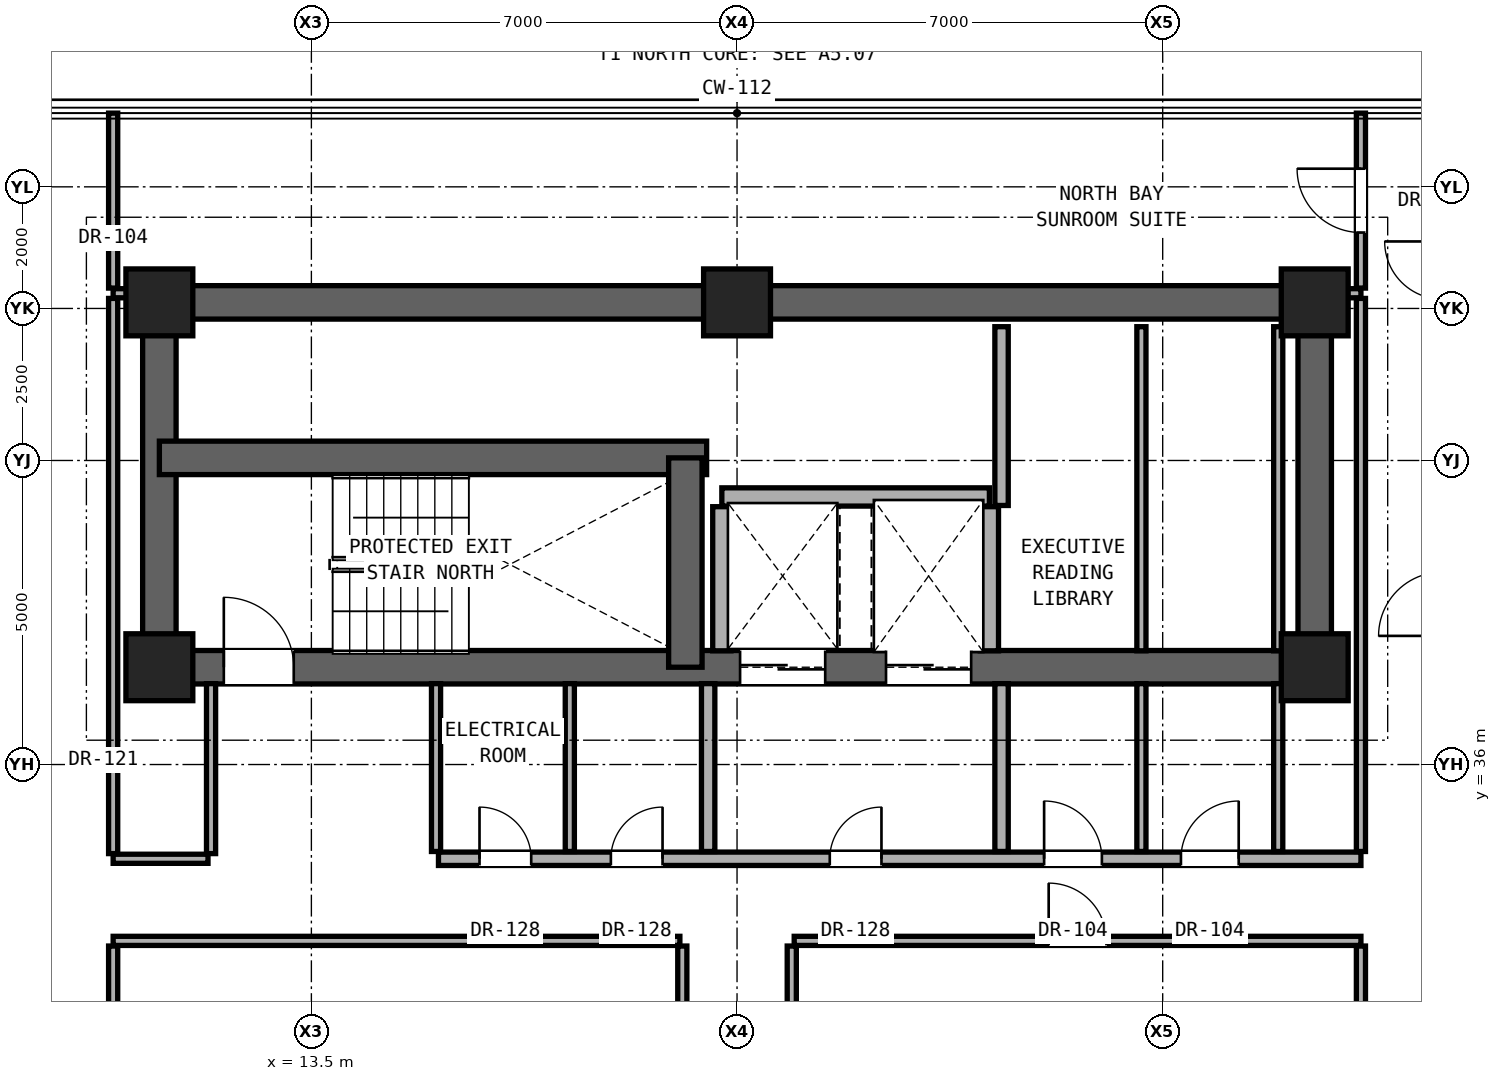
"""IFC4 building model, lengths in metres.
Left out: names, types, materials, properties, quantities, classifications, styles, units other than length and angle.
Written with IfcOpenShell. Run it as: python <this file> out.ifc"""

import sys

from ifc_helpers import new_model, si_unit, direction, frame, frame_2d, origin, origin_2d, place, context, subcontext, project, spatial, rectangle, extrude, element, fill, save


model = new_model("IFC4")
c1 = context("Model", 3, precision=1e-05, world=origin(), true_north=direction((0.0, 1.0)))
c2 = subcontext(c1, "Body", "Model", "MODEL_VIEW")
j1 = project(units=[si_unit("LENGTHUNIT", "METRE"), si_unit("PLANEANGLEUNIT", "RADIAN")], contexts=[c1])
p1 = place(None, origin())
s1 = spatial("IfcSite", under=j1, at=p1, CompositionType="ELEMENT")
p2 = place(p1, origin())
s2 = spatial("IfcBuilding", under=s1, at=p2, CompositionType="ELEMENT")
p3 = place(p2, frame((0.0, 0.0, 131.3)))
s3 = spatial("IfcBuildingStorey", under=s2, at=p3, CompositionType="ELEMENT", Elevation=131.3)
for number, where, z_axis, x_axis in (
    (1, (11.0, 37.6, 0.0), (0.0, 0.0, 1.0), (1.0, 0.0, 0.0)),
    (2, (30.0, 37.6, 0.0), (0.0, 0.0, 1.0), (1.0, 0.0, 0.0)),
    (3, (11.0, 43.6, 0.0), (0.0, 0.0, 1.0), (1.0, 0.0, 0.0)),
    (4, (20.5, 43.6, 0.0), (0.0, 0.0, 1.0), (1.0, 0.0, 0.0)),
    (5, (30.0, 43.6, 0.0), (0.0, 0.0, 1.0), (1.0, 0.0, 0.0)),
):
    element("IfcColumn", number, at=place(p3, frame(where, z_axis=z_axis, x_axis=x_axis)), inside=s3, PredefinedType="COLUMN", context=c2, shape_type="SweptSolid", body=[
        extrude(rectangle(XDim=1.1, YDim=1.1, at=origin_2d()), origin(), (0.0, 0.0, 1.0), 3.3),
    ])
p4 = place(p3, frame((11.0, 43.6, 0.0), z_axis=(0.0, 0.0, 1.0), x_axis=(1.0, 0.0, 0.0)))
e6 = element("IfcWall", 6, at=p4, inside=s3, PredefinedType="SHEAR", context=c2, shape_type="SweptSolid", body=[
    extrude(rectangle(XDim=19.0, YDim=0.55, at=frame_2d((9.5, 0.0))), origin(), (0.0, 0.0, 1.0), 3.08),
])
for number, where, z_axis, x_axis in (
    (7, (11.0, 37.6, 0.0), (0.0, 0.0, 1.0), (0.0, 1.0, 0.0)),
    (8, (30.0, 37.6, 0.0), (0.0, 0.0, 1.0), (0.0, 1.0, 0.0)),
):
    element("IfcWall", number, at=place(p3, frame(where, z_axis=z_axis, x_axis=x_axis)), inside=s3, PredefinedType="SHEAR", context=c2, shape_type="SweptSolid", body=[
        extrude(rectangle(XDim=6.0, YDim=0.55, at=frame_2d((3.0, 0.0))), origin(), (0.0, 0.0, 1.0), 3.08),
    ])
p5 = place(p3, frame((11.0, 37.6, 0.0), z_axis=(0.0, 0.0, 1.0), x_axis=(1.0, 0.0, 0.0)))
e9 = element("IfcWall", 9, at=p5, inside=s3, PredefinedType="SHEAR", context=c2, shape_type="SweptSolid", body=[
    extrude(rectangle(XDim=19.0, YDim=0.55, at=frame_2d((9.5, 0.0))), origin(), (0.0, 0.0, 1.0), 3.08),
])
p6 = place(p5, frame((1.06, 0.0, 0.0)))
e10 = element("IfcOpeningElement", 10, at=p6, cuts=e9, PredefinedType="OPENING", context=c2, shape_type="SweptSolid", body=[
    extrude(rectangle(XDim=1.15, YDim=2.2, at=frame_2d((0.575, 1.1))), frame((0.0, 0.285, 0.0), z_axis=(0.0, -1.0, 0.0), x_axis=(1.0, 0.0, 0.0)), (0.0, 0.0, 1.0), 0.57),
])
p7 = place(p5, frame((9.55, 0.0, 0.0)))
e11 = element("IfcOpeningElement", 11, at=p7, cuts=e9, PredefinedType="OPENING", context=c2, shape_type="SweptSolid", body=[
    extrude(rectangle(XDim=1.4, YDim=2.35, at=frame_2d((0.7, 1.175))), frame((0.0, 0.285, 0.0), z_axis=(0.0, -1.0, 0.0), x_axis=(1.0, 0.0, 0.0)), (0.0, 0.0, 1.0), 0.57),
])
p8 = place(p5, frame((11.95, 0.0, 0.0)))
e12 = element("IfcOpeningElement", 12, at=p8, cuts=e9, PredefinedType="OPENING", context=c2, shape_type="SweptSolid", body=[
    extrude(rectangle(XDim=1.4, YDim=2.35, at=frame_2d((0.7, 1.175))), frame((0.0, 0.285, 0.0), z_axis=(0.0, -1.0, 0.0), x_axis=(1.0, 0.0, 0.0)), (0.0, 0.0, 1.0), 0.57),
])
p9 = place(p3, frame((11.0, 41.043, 0.0), z_axis=(0.0, 0.0, 1.0), x_axis=(1.0, 0.0, 0.0)))
e13 = element("IfcWall", 13, at=p9, inside=s3, PredefinedType="SHEAR", context=c2, shape_type="SweptSolid", body=[
    extrude(rectangle(XDim=9.0, YDim=0.55, at=frame_2d((4.5, 0.0))), origin(), (0.0, 0.0, 1.0), 3.08),
])
p10 = place(p3, frame((19.65, 37.6, 0.0), z_axis=(0.0, 0.0, 1.0), x_axis=(0.0, 1.0, 0.0)))
e14 = element("IfcWall", 14, at=p10, inside=s3, PredefinedType="SHEAR", context=c2, shape_type="SweptSolid", body=[
    extrude(rectangle(XDim=3.443, YDim=0.55, at=frame_2d((1.721, 0.0))), origin(), (0.0, 0.0, 1.0), 3.08),
])
p11 = place(p3, frame((10.24, 33.1, 0.0), z_axis=(0.0, 0.0, 1.0), x_axis=(1.0, 0.0, 0.0)))
e15 = element("IfcWall", 15, at=p11, inside=s3, PredefinedType="PARTITIONING", context=c2, shape_type="SweptSolid", body=[
    extrude(rectangle(XDim=9.32, YDim=0.15, at=frame_2d((4.66, 0.0))), origin(), (0.0, 0.0, 1.0), 2.216),
])
p12 = place(p3, frame((21.44, 33.1, 0.0), z_axis=(0.0, 0.0, 1.0), x_axis=(1.0, 0.0, 0.0)))
e16 = element("IfcWall", 16, at=p12, inside=s3, PredefinedType="PARTITIONING", context=c2, shape_type="SweptSolid", body=[
    extrude(rectangle(XDim=9.32, YDim=0.15, at=frame_2d((4.66, 0.0))), origin(), (0.0, 0.0, 1.0), 2.216),
])
p13 = place(p12, frame((4.185, 0.0, 0.0)))
e17 = element("IfcOpeningElement", 17, at=p13, cuts=e16, PredefinedType="OPENING", context=c2, shape_type="SweptSolid", body=[
    extrude(rectangle(XDim=0.95, YDim=2.15, at=frame_2d((0.475, 1.075))), frame((0.0, 0.085, 0.0), z_axis=(0.0, -1.0, 0.0), x_axis=(1.0, 0.0, 0.0)), (0.0, 0.0, 1.0), 0.17),
])
p14 = place(p3, frame((10.24, 34.45, 0.0), z_axis=(0.0, 0.0, 1.0), x_axis=(1.0, 0.0, 0.0)))
e18 = element("IfcWall", 18, at=p14, inside=s3, PredefinedType="PARTITIONING", context=c2, shape_type="SweptSolid", body=[
    extrude(rectangle(XDim=1.56, YDim=0.15, at=frame_2d((0.78, 0.0))), origin(), (0.0, 0.0, 1.0), 2.216),
])
p15 = place(p3, frame((15.59, 34.45, 0.0), z_axis=(0.0, 0.0, 1.0), x_axis=(1.0, 0.0, 0.0)))
e19 = element("IfcWall", 19, at=p15, inside=s3, PredefinedType="SOLIDWALL", context=c2, shape_type="SweptSolid", body=[
    extrude(rectangle(XDim=15.17, YDim=0.22, at=frame_2d((7.585, 0.0))), origin(), (0.0, 0.0, 1.0), 2.216),
])
p16 = place(p15, frame((6.435, 0.0, 0.0)))
e20 = element("IfcOpeningElement", 20, at=p16, cuts=e19, PredefinedType="OPENING", context=c2, shape_type="SweptSolid", body=[
    extrude(rectangle(XDim=0.85, YDim=2.01, at=frame_2d((0.425, 1.005))), frame((0.0, 0.12, 0.0), z_axis=(0.0, -1.0, 0.0), x_axis=(1.0, 0.0, 0.0)), (0.0, 0.0, 1.0), 0.24),
])
p17 = place(p15, frame((9.96, 0.0, 0.0)))
e21 = element("IfcOpeningElement", 21, at=p17, cuts=e19, PredefinedType="OPENING", context=c2, shape_type="SweptSolid", body=[
    extrude(rectangle(XDim=0.95, YDim=2.15, at=frame_2d((0.475, 1.075))), frame((0.0, 0.12, 0.0), z_axis=(0.0, -1.0, 0.0), x_axis=(1.0, 0.0, 0.0)), (0.0, 0.0, 1.0), 0.24),
])
p18 = place(p15, frame((12.21, 0.0, 0.0)))
e22 = element("IfcOpeningElement", 22, at=p18, cuts=e19, PredefinedType="OPENING", context=c2, shape_type="SweptSolid", body=[
    extrude(rectangle(XDim=0.95, YDim=2.15, at=frame_2d((0.475, 1.075))), frame((0.0, 0.12, 0.0), z_axis=(0.0, -1.0, 0.0), x_axis=(1.0, 0.0, 0.0)), (0.0, 0.0, 1.0), 0.24),
])
p19 = place(p15, frame((0.675, 0.0, 0.0)))
e23 = element("IfcOpeningElement", 23, at=p19, cuts=e19, PredefinedType="OPENING", context=c2, shape_type="SweptSolid", body=[
    extrude(rectangle(XDim=0.85, YDim=2.01, at=frame_2d((0.425, 1.005))), frame((0.0, 0.12, 0.0), z_axis=(0.0, -1.0, 0.0), x_axis=(1.0, 0.0, 0.0)), (0.0, 0.0, 1.0), 0.24),
])
p20 = place(p15, frame((2.835, 0.0, 0.0)))
e24 = element("IfcOpeningElement", 24, at=p20, cuts=e19, PredefinedType="OPENING", context=c2, shape_type="SweptSolid", body=[
    extrude(rectangle(XDim=0.85, YDim=2.01, at=frame_2d((0.425, 1.005))), frame((0.0, 0.12, 0.0), z_axis=(0.0, -1.0, 0.0), x_axis=(1.0, 0.0, 0.0)), (0.0, 0.0, 1.0), 0.24),
])
p21 = place(p3, frame((20.25, 40.4, 0.0), z_axis=(0.0, 0.0, 1.0), x_axis=(1.0, 0.0, 0.0)))
e25 = element("IfcWall", 25, at=p21, inside=s3, PredefinedType="SOLIDWALL", context=c2, shape_type="SweptSolid", body=[
    extrude(rectangle(XDim=4.4, YDim=0.3, at=frame_2d((2.2, 0.0))), origin(), (0.0, 0.0, 1.0), 3.08),
])
for number, where, z_axis, x_axis in (
    (26, (10.24, 43.75, 0.0), (0.0, 0.0, 1.0), (1.0, 0.0, 0.0)),
    (27, (30.27, 43.75, 0.0), (0.0, 0.0, 1.0), (1.0, 0.0, 0.0)),
):
    element("IfcWall", number, at=place(p3, frame(where, z_axis=z_axis, x_axis=x_axis)), inside=s3, PredefinedType="PARTITIONING", context=c2, shape_type="SweptSolid", body=[
        extrude(rectangle(XDim=0.49, YDim=0.15, at=frame_2d((0.245, 0.0))), origin(), (0.0, 0.0, 1.0), 3.08),
    ])
p22 = place(p3, frame((10.24, 27.485, 0.0), z_axis=(0.0, 0.0, 1.0), x_axis=(0.0, 1.0, 0.0)))
e28 = element("IfcWall", 28, at=p22, inside=s3, PredefinedType="PARTITIONING", context=c2, shape_type="SweptSolid", body=[
    extrude(rectangle(XDim=5.53, YDim=0.15, at=frame_2d((2.765, 0.0))), origin(), (0.0, 0.0, 1.0), 2.299),
])
p23 = place(p22, frame((2.29, 0.0, 0.0)))
e29 = element("IfcOpeningElement", 29, at=p23, cuts=e28, PredefinedType="OPENING", context=c2, shape_type="SweptSolid", body=[
    extrude(rectangle(XDim=0.95, YDim=2.15, at=frame_2d((0.475, 1.075))), frame((0.0, 0.085, 0.0), z_axis=(0.0, -1.0, 0.0), x_axis=(1.0, 0.0, 0.0)), (0.0, 0.0, 1.0), 0.17),
])
p24 = place(p3, frame((10.24, 34.535, 0.0), z_axis=(0.0, 0.0, 1.0), x_axis=(0.0, 1.0, 0.0)))
e30 = element("IfcWall", 30, at=p24, inside=s3, PredefinedType="PARTITIONING", context=c2, shape_type="SweptSolid", body=[
    extrude(rectangle(XDim=9.13, YDim=0.15, at=frame_2d((4.565, 0.0))), origin(), (0.0, 0.0, 1.0), 2.456),
])
p25 = place(p3, frame((10.24, 43.835, 0.0), z_axis=(0.0, 0.0, 1.0), x_axis=(0.0, 1.0, 0.0)))
e31 = element("IfcWall", 31, at=p25, inside=s3, PredefinedType="PARTITIONING", context=c2, shape_type="SweptSolid", body=[
    extrude(rectangle(XDim=2.877, YDim=0.15, at=frame_2d((1.438, 0.0))), origin(), (0.0, 0.0, 1.0), 3.08),
])
p26 = place(p3, frame((11.85, 34.535, 0.0), z_axis=(0.0, 0.0, 1.0), x_axis=(0.0, 1.0, 0.0)))
e32 = element("IfcWall", 32, at=p26, inside=s3, PredefinedType="PARTITIONING", context=c2, shape_type="SweptSolid", body=[
    extrude(rectangle(XDim=2.795, YDim=0.15, at=frame_2d((1.397, 0.0))), origin(), (0.0, 0.0, 1.0), 3.08),
])
p27 = place(p3, frame((15.55, 34.57, 0.0), z_axis=(0.0, 0.0, 1.0), x_axis=(0.0, 1.0, 0.0)))
e33 = element("IfcWall", 33, at=p27, inside=s3, PredefinedType="PARTITIONING", context=c2, shape_type="SweptSolid", body=[
    extrude(rectangle(XDim=2.76, YDim=0.15, at=frame_2d((1.38, 0.0))), origin(), (0.0, 0.0, 1.0), 2.609),
])
p28 = place(p3, frame((17.75, 34.57, 0.0), z_axis=(0.0, 0.0, 1.0), x_axis=(0.0, 1.0, 0.0)))
e34 = element("IfcWall", 34, at=p28, inside=s3, PredefinedType="PARTITIONING", context=c2, shape_type="SweptSolid", body=[
    extrude(rectangle(XDim=2.76, YDim=0.15, at=frame_2d((1.38, 0.0))), origin(), (0.0, 0.0, 1.0), 3.08),
])
p29 = place(p3, frame((19.6, 27.485, 0.0), z_axis=(0.0, 0.0, 1.0), x_axis=(0.0, 1.0, 0.0)))
e35 = element("IfcWall", 35, at=p29, inside=s3, PredefinedType="PARTITIONING", context=c2, shape_type="SweptSolid", body=[
    extrude(rectangle(XDim=5.53, YDim=0.15, at=frame_2d((2.765, 0.0))), origin(), (0.0, 0.0, 1.0), 2.216),
])
p30 = place(p3, frame((20.025, 34.57, 0.0), z_axis=(0.0, 0.0, 1.0), x_axis=(0.0, 1.0, 0.0)))
e36 = element("IfcWall", 36, at=p30, inside=s3, PredefinedType="SOLIDWALL", context=c2, shape_type="SweptSolid", body=[
    extrude(rectangle(XDim=2.76, YDim=0.22, at=frame_2d((1.38, 0.0))), origin(), (0.0, 0.0, 1.0), 3.08),
])
p31 = place(p3, frame((20.25, 37.87, 0.0), z_axis=(0.0, 0.0, 1.0), x_axis=(0.0, 1.0, 0.0)))
e37 = element("IfcWall", 37, at=p31, inside=s3, PredefinedType="SOLIDWALL", context=c2, shape_type="SweptSolid", body=[
    extrude(rectangle(XDim=2.37, YDim=0.3, at=frame_2d((1.185, 0.0))), origin(), (0.0, 0.0, 1.0), 3.08),
])
p32 = place(p3, frame((21.4, 27.485, 0.0), z_axis=(0.0, 0.0, 1.0), x_axis=(0.0, 1.0, 0.0)))
e38 = element("IfcWall", 38, at=p32, inside=s3, PredefinedType="PARTITIONING", context=c2, shape_type="SweptSolid", body=[
    extrude(rectangle(XDim=5.53, YDim=0.15, at=frame_2d((2.765, 0.0))), origin(), (0.0, 0.0, 1.0), 2.216),
])
p33 = place(p3, frame((24.65, 37.87, 0.0), z_axis=(0.0, 0.0, 1.0), x_axis=(0.0, 1.0, 0.0)))
e39 = element("IfcWall", 39, at=p33, inside=s3, PredefinedType="SOLIDWALL", context=c2, shape_type="SweptSolid", body=[
    extrude(rectangle(XDim=2.37, YDim=0.3, at=frame_2d((1.185, 0.0))), origin(), (0.0, 0.0, 1.0), 3.08),
])
p34 = place(p3, frame((24.85, 34.57, 0.0), z_axis=(0.0, 0.0, 1.0), x_axis=(0.0, 1.0, 0.0)))
e40 = element("IfcWall", 40, at=p34, inside=s3, PredefinedType="SOLIDWALL", context=c2, shape_type="SweptSolid", body=[
    extrude(rectangle(XDim=2.76, YDim=0.22, at=frame_2d((1.38, 0.0))), origin(), (0.0, 0.0, 1.0), 3.08),
])
p35 = place(p3, frame((24.85, 40.26, 0.0), z_axis=(0.0, 0.0, 1.0), x_axis=(0.0, 1.0, 0.0)))
e41 = element("IfcWall", 41, at=p35, inside=s3, PredefinedType="SOLIDWALL", context=c2, shape_type="SweptSolid", body=[
    extrude(rectangle(XDim=2.94, YDim=0.22, at=frame_2d((1.47, 0.0))), origin(), (0.0, 0.0, 1.0), 3.08),
])
p36 = place(p3, frame((27.15, 34.57, 0.0), z_axis=(0.0, 0.0, 1.0), x_axis=(0.0, 1.0, 0.0)))
e42 = element("IfcWall", 42, at=p36, inside=s3, PredefinedType="PARTITIONING", context=c2, shape_type="SweptSolid", body=[
    extrude(rectangle(XDim=2.76, YDim=0.15, at=frame_2d((1.38, 0.0))), origin(), (0.0, 0.0, 1.0), 3.08),
])
p37 = place(p3, frame((27.15, 37.87, 0.0), z_axis=(0.0, 0.0, 1.0), x_axis=(0.0, 1.0, 0.0)))
e43 = element("IfcWall", 43, at=p37, inside=s3, PredefinedType="PARTITIONING", context=c2, shape_type="SweptSolid", body=[
    extrude(rectangle(XDim=5.33, YDim=0.15, at=frame_2d((2.665, 0.0))), origin(), (0.0, 0.0, 1.0), 3.08),
])
p38 = place(p3, frame((29.4, 34.57, 0.0), z_axis=(0.0, 0.0, 1.0), x_axis=(0.0, 1.0, 0.0)))
e44 = element("IfcWall", 44, at=p38, inside=s3, PredefinedType="PARTITIONING", context=c2, shape_type="SweptSolid", body=[
    extrude(rectangle(XDim=2.76, YDim=0.15, at=frame_2d((1.38, 0.0))), origin(), (0.0, 0.0, 1.0), 3.08),
])
p39 = place(p3, frame((29.4, 37.87, 0.0), z_axis=(0.0, 0.0, 1.0), x_axis=(0.0, 1.0, 0.0)))
e45 = element("IfcWall", 45, at=p39, inside=s3, PredefinedType="PARTITIONING", context=c2, shape_type="SweptSolid", body=[
    extrude(rectangle(XDim=5.33, YDim=0.15, at=frame_2d((2.665, 0.0))), origin(), (0.0, 0.0, 1.0), 3.08),
])
p40 = place(p3, frame((30.76, 27.485, 0.0), z_axis=(0.0, 0.0, 1.0), x_axis=(0.0, 1.0, 0.0)))
e46 = element("IfcWall", 46, at=p40, inside=s3, PredefinedType="PARTITIONING", context=c2, shape_type="SweptSolid", body=[
    extrude(rectangle(XDim=5.53, YDim=0.15, at=frame_2d((2.765, 0.0))), origin(), (0.0, 0.0, 1.0), 2.299),
])
p41 = place(p3, frame((30.76, 34.57, 0.0), z_axis=(0.0, 0.0, 1.0), x_axis=(0.0, 1.0, 0.0)))
e47 = element("IfcWall", 47, at=p41, inside=s3, PredefinedType="PARTITIONING", context=c2, shape_type="SweptSolid", body=[
    extrude(rectangle(XDim=9.095, YDim=0.15, at=frame_2d((4.547, 0.0))), origin(), (0.0, 0.0, 1.0), 2.456),
])
p42 = place(p3, frame((30.76, 43.835, 0.0), z_axis=(0.0, 0.0, 1.0), x_axis=(0.0, 1.0, 0.0)))
e48 = element("IfcWall", 48, at=p42, inside=s3, PredefinedType="PARTITIONING", context=c2, shape_type="SweptSolid", body=[
    extrude(rectangle(XDim=2.877, YDim=0.15, at=frame_2d((1.438, 0.0))), origin(), (0.0, 0.0, 1.0), 3.08),
])
p43 = place(p42, frame((0.914, 0.0, 0.0)))
e49 = element("IfcOpeningElement", 49, at=p43, cuts=e48, PredefinedType="OPENING", context=c2, shape_type="SweptSolid", body=[
    extrude(rectangle(XDim=1.05, YDim=2.2, at=frame_2d((0.525, 1.1))), frame((0.0, 0.085, 0.0), z_axis=(0.0, -1.0, 0.0), x_axis=(1.0, 0.0, 0.0)), (0.0, 0.0, 1.0), 0.17),
])
p44 = place(p6, origin())
e50 = element("IfcDoor", 50, at=p44, inside=s3, OperationType="SINGLE_SWING_LEFT", PredefinedType="DOOR", context=c2, shape_type="SweptSolid", body=[
    extrude(rectangle(XDim=1.15, YDim=2.2, at=frame_2d((0.575, 1.1))), frame((0.0, 0.025, 0.0), z_axis=(0.0, -1.0, 0.0), x_axis=(1.0, 0.0, 0.0)), (0.0, 0.0, 1.0), 0.05),
])
fill(e10, e50)
p45 = place(p16, origin())
e51 = element("IfcDoor", 51, at=p45, inside=s3, OperationType="SINGLE_SWING_RIGHT", PredefinedType="DOOR", context=c2, shape_type="SweptSolid", body=[
    extrude(rectangle(XDim=0.85, YDim=2.01, at=frame_2d((0.425, 1.005))), frame((0.0, 0.025, 0.0), z_axis=(0.0, -1.0, 0.0), x_axis=(1.0, 0.0, 0.0)), (0.0, 0.0, 1.0), 0.05),
])
fill(e20, e51)
p46 = place(p17, origin())
e52 = element("IfcDoor", 52, at=p46, inside=s3, OperationType="SINGLE_SWING_LEFT", PredefinedType="DOOR", context=c2, shape_type="SweptSolid", body=[
    extrude(rectangle(XDim=0.95, YDim=2.15, at=frame_2d((0.475, 1.075))), frame((0.0, 0.025, 0.0), z_axis=(0.0, -1.0, 0.0), x_axis=(1.0, 0.0, 0.0)), (0.0, 0.0, 1.0), 0.05),
])
fill(e21, e52)
p47 = place(p18, origin())
e53 = element("IfcDoor", 53, at=p47, inside=s3, OperationType="SINGLE_SWING_RIGHT", PredefinedType="DOOR", context=c2, shape_type="SweptSolid", body=[
    extrude(rectangle(XDim=0.95, YDim=2.15, at=frame_2d((0.475, 1.075))), frame((0.0, 0.025, 0.0), z_axis=(0.0, -1.0, 0.0), x_axis=(1.0, 0.0, 0.0)), (0.0, 0.0, 1.0), 0.05),
])
fill(e22, e53)
p48 = place(p19, origin())
e54 = element("IfcDoor", 54, at=p48, inside=s3, OperationType="SINGLE_SWING_LEFT", PredefinedType="DOOR", context=c2, shape_type="SweptSolid", body=[
    extrude(rectangle(XDim=0.85, YDim=2.01, at=frame_2d((0.425, 1.005))), frame((0.0, 0.025, 0.0), z_axis=(0.0, -1.0, 0.0), x_axis=(1.0, 0.0, 0.0)), (0.0, 0.0, 1.0), 0.05),
])
fill(e23, e54)
p49 = place(p20, origin())
e55 = element("IfcDoor", 55, at=p49, inside=s3, OperationType="SINGLE_SWING_RIGHT", PredefinedType="DOOR", context=c2, shape_type="SweptSolid", body=[
    extrude(rectangle(XDim=0.85, YDim=2.01, at=frame_2d((0.425, 1.005))), frame((0.0, 0.025, 0.0), z_axis=(0.0, -1.0, 0.0), x_axis=(1.0, 0.0, 0.0)), (0.0, 0.0, 1.0), 0.05),
])
fill(e24, e55)
p50 = place(p13, origin())
e56 = element("IfcDoor", 56, at=p50, inside=s3, OperationType="SINGLE_SWING_LEFT", PredefinedType="DOOR", context=c2, shape_type="SweptSolid", body=[
    extrude(rectangle(XDim=0.95, YDim=2.15, at=frame_2d((0.475, 1.075))), frame((0.0, 0.025, 0.0), z_axis=(0.0, -1.0, 0.0), x_axis=(1.0, 0.0, 0.0)), (0.0, 0.0, 1.0), 0.05),
])
fill(e17, e56)
p51 = place(p43, origin())
e57 = element("IfcDoor", 57, at=p51, inside=s3, OperationType="SINGLE_SWING_RIGHT", PredefinedType="DOOR", context=c2, shape_type="SweptSolid", body=[
    extrude(rectangle(XDim=1.05, YDim=2.2, at=frame_2d((0.525, 1.1))), frame((0.0, 0.025, 0.0), z_axis=(0.0, -1.0, 0.0), x_axis=(1.0, 0.0, 0.0)), (0.0, 0.0, 1.0), 0.05),
])
fill(e49, e57)
p52 = place(p7, origin())
e58 = element("IfcDoor", 58, at=p52, inside=s3, OperationType="DOUBLE_DOOR_SLIDING", PredefinedType="DOOR", context=c2, shape_type="SweptSolid", body=[
    extrude(rectangle(XDim=1.4, YDim=2.35, at=frame_2d((0.7, 1.175))), frame((0.0, 0.025, 0.0), z_axis=(0.0, -1.0, 0.0), x_axis=(1.0, 0.0, 0.0)), (0.0, 0.0, 1.0), 0.05),
])
fill(e11, e58)
p53 = place(p8, origin())
e59 = element("IfcDoor", 59, at=p53, inside=s3, OperationType="DOUBLE_DOOR_SLIDING", PredefinedType="DOOR", context=c2, shape_type="SweptSolid", body=[
    extrude(rectangle(XDim=1.4, YDim=2.35, at=frame_2d((0.7, 1.175))), frame((0.0, 0.025, 0.0), z_axis=(0.0, -1.0, 0.0), x_axis=(1.0, 0.0, 0.0)), (0.0, 0.0, 1.0), 0.05),
])
fill(e12, e59)
save(model, sys.argv[1])
